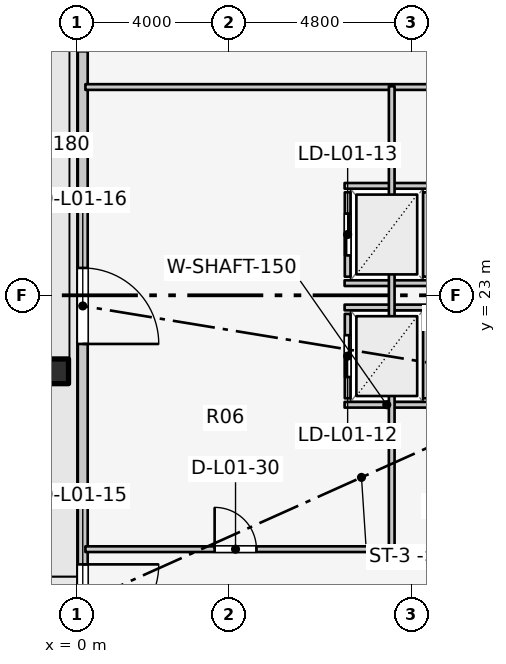
"""IFC4 building model, lengths in metres.
Left out: names, types, materials, properties, quantities, classifications, styles, units other than length and angle.
Written with IfcOpenShell. Run it as: python <this file> out.ifc"""

import sys

from ifc_helpers import new_model, si_unit, direction, frame, frame_2d, origin, origin_2d, place, context, subcontext, project, spatial, rectangle, extrude, element, fill, save


model = new_model("IFC4")
c1 = context("Model", 3, precision=1e-05, world=origin(), true_north=direction((0.0, 1.0)))
c2 = subcontext(c1, "Body", "Model", "MODEL_VIEW")
j1 = project(units=[si_unit("LENGTHUNIT", "METRE"), si_unit("PLANEANGLEUNIT", "RADIAN")], contexts=[c1])
p1 = place(None, origin())
s1 = spatial("IfcSite", under=j1, at=p1, CompositionType="ELEMENT")
p2 = place(p1, origin())
s2 = spatial("IfcBuilding", under=s1, at=p2, CompositionType="ELEMENT")
p3 = place(p2, origin())
s3 = spatial("IfcBuildingStorey", under=s2, at=p3, CompositionType="ELEMENT", Elevation=0.0)
p4 = place(p3, frame((-0.55, 21.0, 0.0), z_axis=(0.0, 0.0, 1.0), x_axis=(1.0, 0.0, 0.0)))
e1 = element("IfcColumn", 1, at=p4, inside=s3, PredefinedType="PILASTER", context=c2, shape_type="SweptSolid", body=[
    extrude(rectangle(XDim=0.65, YDim=0.65, at=origin_2d()), origin(), (0.0, 0.0, 1.0), 4.04),
])
p5 = place(p3, frame((0.15, 45.72, 0.0), z_axis=(0.0, 0.0, 1.0), x_axis=(0.0, -1.0, 0.0)))
e2 = element("IfcWall", 2, at=p5, inside=s3, PredefinedType="STANDARD", context=c2, shape_type="SweptSolid", body=[
    extrude(rectangle(XDim=45.44, YDim=0.26, at=frame_2d((22.72, 0.0))), origin(), (0.0, 0.0, 1.0), 4.28),
])
p6 = place(p5, frame((29.8, 0.0, 0.0)))
e3 = element("IfcOpeningElement", 3, at=p6, cuts=e2, PredefinedType="OPENING", context=c2, shape_type="SweptSolid", body=[
    extrude(rectangle(XDim=2.0, YDim=2.4, at=frame_2d((1.0, 1.2))), frame((0.0, 0.14, 0.0), z_axis=(0.0, -1.0, 0.0), x_axis=(1.0, 0.0, 0.0)), (0.0, 0.0, 1.0), 0.28),
])
p7 = place(p5, frame((22.0, 0.0, 0.0)))
e4 = element("IfcOpeningElement", 4, at=p7, cuts=e2, PredefinedType="OPENING", context=c2, shape_type="SweptSolid", body=[
    extrude(rectangle(XDim=2.0, YDim=2.4, at=frame_2d((1.0, 1.2))), frame((0.0, 0.14, 0.0), z_axis=(0.0, -1.0, 0.0), x_axis=(1.0, 0.0, 0.0)), (0.0, 0.0, 1.0), 0.28),
])
p8 = place(p5, frame((36.5, 0.0, 0.0)))
e5 = element("IfcOpeningElement", 5, at=p8, cuts=e2, PredefinedType="OPENING", context=c2, shape_type="SweptSolid", body=[
    extrude(rectangle(XDim=2.0, YDim=2.4, at=frame_2d((1.0, 1.2))), frame((0.0, 0.14, 0.0), z_axis=(0.0, -1.0, 0.0), x_axis=(1.0, 0.0, 0.0)), (0.0, 0.0, 1.0), 0.28),
])
p9 = place(p5, frame((12.1, 0.0, 0.0)))
e6 = element("IfcOpeningElement", 6, at=p9, cuts=e2, PredefinedType="OPENING", context=c2, shape_type="SweptSolid", body=[
    extrude(rectangle(XDim=4.2, YDim=3.0, at=frame_2d((2.1, 1.5))), frame((0.0, 0.14, 0.0), z_axis=(0.0, -1.0, 0.0), x_axis=(1.0, 0.0, 0.0)), (0.0, 0.0, 1.0), 0.28),
])
p10 = place(p3, frame((7.12, 20.29, 0.0), z_axis=(0.0, 0.0, 1.0), x_axis=(0.0, 1.0, 0.0)))
e7 = element("IfcWall", 7, at=p10, inside=s3, PredefinedType="SOLIDWALL", context=c2, shape_type="SweptSolid", body=[
    extrude(rectangle(XDim=2.22, YDim=0.15, at=frame_2d((1.11, 0.0))), origin(), (0.0, 0.0, 1.0), 4.255),
])
p11 = place(p10, frame((0.56, 0.0, 0.0)))
e8 = element("IfcOpeningElement", 8, at=p11, cuts=e7, PredefinedType="OPENING", context=c2, shape_type="SweptSolid", body=[
    extrude(rectangle(XDim=1.1, YDim=2.1, at=frame_2d((0.55, 1.05))), frame((0.0, 0.085, 0.0), z_axis=(0.0, -1.0, 0.0), x_axis=(1.0, 0.0, 0.0)), (0.0, 0.0, 1.0), 0.17),
])
for number, where, z_axis, x_axis in (
    (9, (9.18, 20.29, 0.0), (0.0, 0.0, 1.0), (0.0, 1.0, 0.0)),
    (10, (7.04, 20.12, 0.0), (0.0, 0.0, 1.0), (1.0, 0.0, 0.0)),
    (11, (7.04, 22.68, 0.0), (0.0, 0.0, 1.0), (1.0, 0.0, 0.0)),
):
    element("IfcWall", number, at=place(p3, frame(where, z_axis=z_axis, x_axis=x_axis)), inside=s3, PredefinedType="SOLIDWALL", context=c2, shape_type="SweptSolid", body=[
        extrude(rectangle(XDim=2.22, YDim=0.15, at=frame_2d((1.11, 0.0))), origin(), (0.0, 0.0, 1.0), 4.255),
    ])
p12 = place(p3, frame((7.12, 23.49, 0.0), z_axis=(0.0, 0.0, 1.0), x_axis=(0.0, 1.0, 0.0)))
e12 = element("IfcWall", 12, at=p12, inside=s3, PredefinedType="SOLIDWALL", context=c2, shape_type="SweptSolid", body=[
    extrude(rectangle(XDim=2.22, YDim=0.15, at=frame_2d((1.11, 0.0))), origin(), (0.0, 0.0, 1.0), 4.255),
])
p13 = place(p12, frame((0.56, 0.0, 0.0)))
e13 = element("IfcOpeningElement", 13, at=p13, cuts=e12, PredefinedType="OPENING", context=c2, shape_type="SweptSolid", body=[
    extrude(rectangle(XDim=1.1, YDim=2.1, at=frame_2d((0.55, 1.05))), frame((0.0, 0.085, 0.0), z_axis=(0.0, -1.0, 0.0), x_axis=(1.0, 0.0, 0.0)), (0.0, 0.0, 1.0), 0.17),
])
for number, where, z_axis, x_axis in (
    (14, (9.18, 23.49, 0.0), (0.0, 0.0, 1.0), (0.0, 1.0, 0.0)),
    (15, (7.04, 23.32, 0.0), (0.0, 0.0, 1.0), (1.0, 0.0, 0.0)),
    (16, (7.04, 25.88, 0.0), (0.0, 0.0, 1.0), (1.0, 0.0, 0.0)),
):
    element("IfcWall", number, at=place(p3, frame(where, z_axis=z_axis, x_axis=x_axis)), inside=s3, PredefinedType="SOLIDWALL", context=c2, shape_type="SweptSolid", body=[
        extrude(rectangle(XDim=2.22, YDim=0.15, at=frame_2d((1.11, 0.0))), origin(), (0.0, 0.0, 1.0), 4.255),
    ])
p14 = place(p3, frame((0.22, 16.32, 0.0), z_axis=(0.0, 0.0, 1.0), x_axis=(1.0, 0.0, 0.0)))
e17 = element("IfcWall", 17, at=p14, inside=s3, PredefinedType="PARTITIONING", context=c2, shape_type="SweptSolid", body=[
    extrude(rectangle(XDim=8.1, YDim=0.15, at=frame_2d((4.05, 0.0))), origin(), (0.0, 0.0, 1.0), 3.3),
])
p15 = place(p14, frame((3.4, 0.0, 0.0)))
e18 = element("IfcOpeningElement", 18, at=p15, cuts=e17, PredefinedType="OPENING", context=c2, shape_type="SweptSolid", body=[
    extrude(rectangle(XDim=1.1, YDim=2.1, at=frame_2d((0.55, 1.05))), frame((0.0, 0.085, 0.0), z_axis=(0.0, -1.0, 0.0), x_axis=(1.0, 0.0, 0.0)), (0.0, 0.0, 1.0), 0.17),
])
p16 = place(p3, frame((0.22, 28.48, 0.0), z_axis=(0.0, 0.0, 1.0), x_axis=(1.0, 0.0, 0.0)))
e19 = element("IfcWall", 19, at=p16, inside=s3, PredefinedType="PARTITIONING", context=c2, shape_type="SweptSolid", body=[
    extrude(rectangle(XDim=14.4, YDim=0.15, at=frame_2d((7.2, 0.0))), origin(), (0.0, 0.0, 1.0), 3.3),
])
p17 = place(p3, frame((8.28, 16.3, 0.0), z_axis=(0.0, 0.0, 1.0), x_axis=(0.0, 1.0, 0.0)))
e20 = element("IfcWall", 20, at=p17, inside=s3, PredefinedType="PARTITIONING", context=c2, shape_type="SweptSolid", body=[
    extrude(rectangle(XDim=12.2, YDim=0.15, at=frame_2d((6.1, 0.0))), origin(), (0.0, 0.0, 1.0), 4.255),
])
p18 = place(p6, frame((2.0, 0.0, 0.0), z_axis=(0.0, 0.0, 1.0), x_axis=(-1.0, 0.0, 0.0)))
e21 = element("IfcDoor", 21, at=p18, inside=s3, OperationType="SINGLE_SWING_LEFT", PredefinedType="DOOR", context=c2, shape_type="SweptSolid", body=[
    extrude(rectangle(XDim=2.0, YDim=2.4, at=frame_2d((1.0, 1.2))), frame((0.0, 0.025, 0.0), z_axis=(0.0, -1.0, 0.0), x_axis=(1.0, 0.0, 0.0)), (0.0, 0.0, 1.0), 0.05),
])
fill(e3, e21)
p19 = place(p7, frame((2.0, 0.0, 0.0), z_axis=(0.0, 0.0, 1.0), x_axis=(-1.0, 0.0, 0.0)))
e22 = element("IfcDoor", 22, at=p19, inside=s3, OperationType="SINGLE_SWING_RIGHT", PredefinedType="DOOR", context=c2, shape_type="SweptSolid", body=[
    extrude(rectangle(XDim=2.0, YDim=2.4, at=frame_2d((1.0, 1.2))), frame((0.0, 0.025, 0.0), z_axis=(0.0, -1.0, 0.0), x_axis=(1.0, 0.0, 0.0)), (0.0, 0.0, 1.0), 0.05),
])
fill(e4, e22)
p20 = place(p11, origin())
e23 = element("IfcDoor", 23, at=p20, inside=s3, OperationType="DOUBLE_DOOR_SLIDING", PredefinedType="DOOR", context=c2, shape_type="SweptSolid", body=[
    extrude(rectangle(XDim=1.1, YDim=2.1, at=frame_2d((0.55, 1.05))), frame((0.0, 0.025, 0.0), z_axis=(0.0, -1.0, 0.0), x_axis=(1.0, 0.0, 0.0)), (0.0, 0.0, 1.0), 0.05),
])
fill(e8, e23)
p21 = place(p13, origin())
e24 = element("IfcDoor", 24, at=p21, inside=s3, OperationType="DOUBLE_DOOR_SLIDING", PredefinedType="DOOR", context=c2, shape_type="SweptSolid", body=[
    extrude(rectangle(XDim=1.1, YDim=2.1, at=frame_2d((0.55, 1.05))), frame((0.0, 0.025, 0.0), z_axis=(0.0, -1.0, 0.0), x_axis=(1.0, 0.0, 0.0)), (0.0, 0.0, 1.0), 0.05),
])
fill(e13, e24)
p22 = place(p15, origin())
e25 = element("IfcDoor", 25, at=p22, inside=s3, OperationType="SINGLE_SWING_LEFT", PredefinedType="DOOR", context=c2, shape_type="SweptSolid", body=[
    extrude(rectangle(XDim=1.1, YDim=2.1, at=frame_2d((0.55, 1.05))), frame((0.0, 0.025, 0.0), z_axis=(0.0, -1.0, 0.0), x_axis=(1.0, 0.0, 0.0)), (0.0, 0.0, 1.0), 0.05),
])
fill(e18, e25)
save(model, sys.argv[1])
